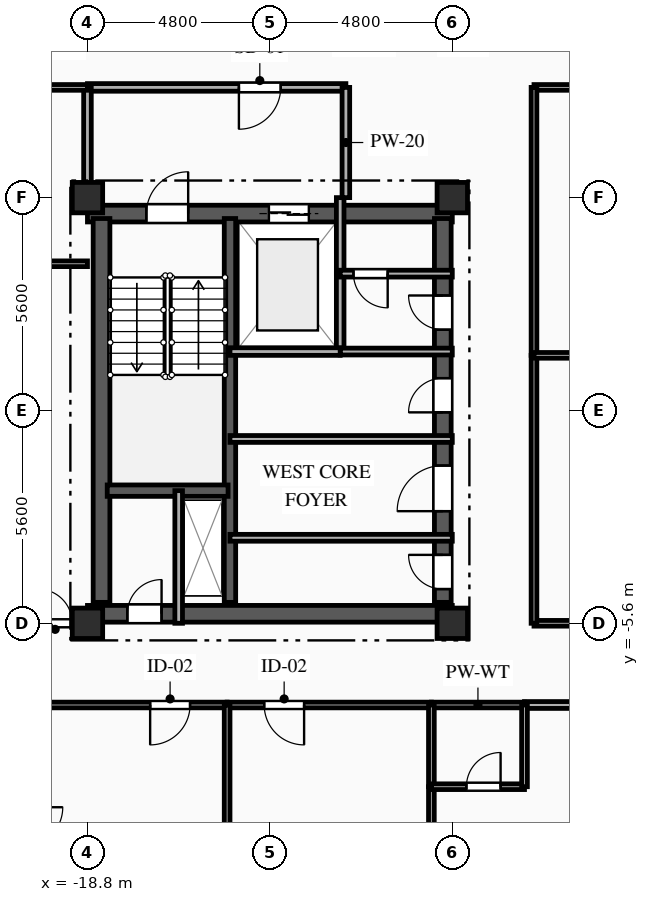
"""IFC4 building model, lengths in metres.
Left out: names, types, materials, properties, quantities, classifications, styles, units other than length and angle.
Written with IfcOpenShell. Run it as: python <this file> out.ifc"""

import sys

from ifc_helpers import new_model, si_unit, direction, frame, frame_2d, origin, origin_2d, place, context, subcontext, project, spatial, rectangle, extrude, element, fill, save


model = new_model("IFC4")
c1 = context("Model", 3, precision=1e-05, world=origin(), true_north=direction((0.0, 1.0)))
c2 = subcontext(c1, "Body", "Model", "MODEL_VIEW")
j1 = project(units=[si_unit("LENGTHUNIT", "METRE"), si_unit("PLANEANGLEUNIT", "RADIAN")], contexts=[c1])
p1 = place(None, origin())
s1 = spatial("IfcSite", under=j1, at=p1, CompositionType="ELEMENT")
p2 = place(p1, origin())
s2 = spatial("IfcBuilding", under=s1, at=p2, CompositionType="ELEMENT")
p3 = place(p2, frame((0.0, 0.0, 251.75)))
s3 = spatial("IfcBuildingStorey", under=s2, at=p3, CompositionType="ELEMENT", Elevation=251.75)
for number, where, z_axis, x_axis in (
    (1, (-18.8, -5.6, 0.0), (0.0, 0.0, 1.0), (1.0, 0.0, 0.0)),
    (2, (-18.8, 5.6, 0.0), (0.0, 0.0, 1.0), (1.0, 0.0, 0.0)),
    (3, (-9.2, -5.6, 0.0), (0.0, 0.0, 1.0), (1.0, 0.0, 0.0)),
    (4, (-9.2, 5.6, 0.0), (0.0, 0.0, 1.0), (1.0, 0.0, 0.0)),
):
    element("IfcColumn", number, at=place(p3, frame(where, z_axis=z_axis, x_axis=x_axis)), inside=s3, PredefinedType="COLUMN", context=c2, shape_type="SweptSolid", body=[
        extrude(rectangle(XDim=0.8, YDim=0.8, at=origin_2d()), origin(), (0.0, 0.0, 1.0), 3.35),
    ])
p4 = place(p3, frame((-18.8, 5.18, 0.0), z_axis=(0.0, 0.0, 1.0), x_axis=(1.0, 0.0, 0.0)))
e5 = element("IfcWall", 5, at=p4, inside=s3, PredefinedType="SHEAR", context=c2, shape_type="SweptSolid", body=[
    extrude(rectangle(XDim=9.6, YDim=0.44, at=frame_2d((4.8, 0.0))), origin(), (0.0, 0.0, 1.0), 3.04),
])
p5 = place(p4, frame((1.55, 0.0, 0.0)))
e6 = element("IfcOpeningElement", 6, at=p5, cuts=e5, PredefinedType="OPENING", context=c2, shape_type="SweptSolid", body=[
    extrude(rectangle(XDim=1.1, YDim=2.15, at=frame_2d((0.55, 1.075))), frame((0.0, 0.23, 0.0), z_axis=(0.0, -1.0, 0.0), x_axis=(1.0, 0.0, 0.0)), (0.0, 0.0, 1.0), 0.46),
])
p6 = place(p4, frame((4.775, 0.0, 0.0)))
e7 = element("IfcOpeningElement", 7, at=p6, cuts=e5, PredefinedType="OPENING", context=c2, shape_type="SweptSolid", body=[
    extrude(rectangle(XDim=1.05, YDim=2.1, at=frame_2d((0.525, 1.05))), frame((0.0, 0.23, 0.0), z_axis=(0.0, -1.0, 0.0), x_axis=(1.0, 0.0, 0.0)), (0.0, 0.0, 1.0), 0.46),
])
p7 = place(p3, frame((-18.8, -5.35, 0.0), z_axis=(0.0, 0.0, 1.0), x_axis=(1.0, 0.0, 0.0)))
e8 = element("IfcWall", 8, at=p7, inside=s3, PredefinedType="SHEAR", context=c2, shape_type="SweptSolid", body=[
    extrude(rectangle(XDim=9.6, YDim=0.44, at=frame_2d((4.8, 0.0))), origin(), (0.0, 0.0, 1.0), 3.04),
])
p8 = place(p7, frame((1.05, 0.0, 0.0)))
e9 = element("IfcOpeningElement", 9, at=p8, cuts=e8, PredefinedType="OPENING", context=c2, shape_type="SweptSolid", body=[
    extrude(rectangle(XDim=0.9, YDim=2.1, at=frame_2d((0.45, 1.05))), frame((0.0, 0.23, 0.0), z_axis=(0.0, -1.0, 0.0), x_axis=(1.0, 0.0, 0.0)), (0.0, 0.0, 1.0), 0.46),
])
p9 = place(p3, frame((-18.43, -5.05, 0.0), z_axis=(0.0, 0.0, 1.0), x_axis=(0.0, 1.0, 0.0)))
e10 = element("IfcWall", 10, at=p9, inside=s3, PredefinedType="SHEAR", context=c2, shape_type="SweptSolid", body=[
    extrude(rectangle(XDim=10.1, YDim=0.44, at=frame_2d((5.05, 0.0))), origin(), (0.0, 0.0, 1.0), 3.04),
])
p10 = place(p3, frame((-9.45, -5.05, 0.0), z_axis=(0.0, 0.0, 1.0), x_axis=(0.0, 1.0, 0.0)))
e11 = element("IfcWall", 11, at=p10, inside=s3, PredefinedType="SHEAR", context=c2, shape_type="SweptSolid", body=[
    extrude(rectangle(XDim=10.1, YDim=0.44, at=frame_2d((5.05, 0.0))), origin(), (0.0, 0.0, 1.0), 3.04),
])
p11 = place(p10, frame((7.175, 0.0, 0.0)))
e12 = element("IfcOpeningElement", 12, at=p11, cuts=e11, PredefinedType="OPENING", context=c2, shape_type="SweptSolid", body=[
    extrude(rectangle(XDim=0.9, YDim=2.1, at=frame_2d((0.45, 1.05))), frame((0.0, 0.23, 0.0), z_axis=(0.0, -1.0, 0.0), x_axis=(1.0, 0.0, 0.0)), (0.0, 0.0, 1.0), 0.46),
])
p12 = place(p10, frame((2.4, 0.0, 0.0)))
e13 = element("IfcOpeningElement", 13, at=p12, cuts=e11, PredefinedType="OPENING", context=c2, shape_type="SweptSolid", body=[
    extrude(rectangle(XDim=1.2, YDim=2.15, at=frame_2d((0.6, 1.075))), frame((0.0, 0.23, 0.0), z_axis=(0.0, -1.0, 0.0), x_axis=(1.0, 0.0, 0.0)), (0.0, 0.0, 1.0), 0.46),
])
p13 = place(p10, frame((0.35, 0.0, 0.0)))
e14 = element("IfcOpeningElement", 14, at=p13, cuts=e11, PredefinedType="OPENING", context=c2, shape_type="SweptSolid", body=[
    extrude(rectangle(XDim=0.9, YDim=2.1, at=frame_2d((0.45, 1.05))), frame((0.0, 0.23, 0.0), z_axis=(0.0, -1.0, 0.0), x_axis=(1.0, 0.0, 0.0)), (0.0, 0.0, 1.0), 0.46),
])
p14 = place(p10, frame((5.0, 0.0, 0.0)))
e15 = element("IfcOpeningElement", 15, at=p14, cuts=e11, PredefinedType="OPENING", context=c2, shape_type="SweptSolid", body=[
    extrude(rectangle(XDim=0.9, YDim=2.1, at=frame_2d((0.45, 1.05))), frame((0.0, 0.23, 0.0), z_axis=(0.0, -1.0, 0.0), x_axis=(1.0, 0.0, 0.0)), (0.0, 0.0, 1.0), 0.46),
])
p15 = place(p3, frame((-15.05, -5.05, 0.0), z_axis=(0.0, 0.0, 1.0), x_axis=(0.0, 1.0, 0.0)))
e16 = element("IfcWall", 16, at=p15, inside=s3, PredefinedType="SHEAR", context=c2, shape_type="SweptSolid", body=[
    extrude(rectangle(XDim=10.1, YDim=0.3, at=frame_2d((5.05, 0.0))), origin(), (0.0, 0.0, 1.0), 3.04),
])
p16 = place(p3, frame((-18.28, -2.11, 0.0), z_axis=(0.0, 0.0, 1.0), x_axis=(1.0, 0.0, 0.0)))
e17 = element("IfcWall", 17, at=p16, inside=s3, PredefinedType="SHEAR", context=c2, shape_type="SweptSolid", body=[
    extrude(rectangle(XDim=3.18, YDim=0.3, at=frame_2d((1.59, 0.0))), origin(), (0.0, 0.0, 1.0), 3.04),
])
p17 = place(p3, frame((-16.4, -5.6, 0.0), z_axis=(0.0, 0.0, 1.0), x_axis=(0.0, 1.0, 0.0)))
e18 = element("IfcWall", 18, at=p17, inside=s3, PredefinedType="PARTITIONING", context=c2, shape_type="SweptSolid", body=[
    extrude(rectangle(XDim=3.49, YDim=0.2, at=frame_2d((1.745, 0.0))), origin(), (0.0, 0.0, 1.0), 3.04),
])
p18 = place(p3, frame((-12.15, 1.55, 0.0), z_axis=(0.0, 0.0, 1.0), x_axis=(0.0, 1.0, 0.0)))
e19 = element("IfcWall", 19, at=p18, inside=s3, PredefinedType="PARTITIONING", context=c2, shape_type="SweptSolid", body=[
    extrude(rectangle(XDim=2.05, YDim=0.2, at=frame_2d((1.025, 0.0))), origin(), (0.0, 0.0, 1.0), 3.04),
])
p19 = place(p3, frame((-12.15, 3.6, 0.0), z_axis=(0.0, 0.0, 1.0), x_axis=(0.0, 1.0, 0.0)))
e20 = element("IfcWall", 20, at=p19, inside=s3, PredefinedType="PARTITIONING", context=c2, shape_type="SweptSolid", body=[
    extrude(rectangle(XDim=2.0, YDim=0.2, at=frame_2d((1.0, 0.0))), origin(), (0.0, 0.0, 1.0), 3.04),
])
p20 = place(p3, frame((-12.0, 8.5, 0.0), z_axis=(0.0, 0.0, 1.0), x_axis=(-1.0, 0.0, 0.0)))
e21 = element("IfcWall", 21, at=p20, inside=s3, PredefinedType="PARTITIONING", context=c2, shape_type="SweptSolid", body=[
    extrude(rectangle(XDim=6.8, YDim=0.2, at=frame_2d((3.4, 0.0))), origin(), (0.0, 0.0, 1.0), 3.04),
])
p21 = place(p20, frame((1.715, 0.0, 0.0)))
e22 = element("IfcOpeningElement", 22, at=p21, cuts=e21, PredefinedType="OPENING", context=c2, shape_type="SweptSolid", body=[
    extrude(rectangle(XDim=1.1, YDim=2.15, at=frame_2d((0.55, 1.075))), frame((0.0, 0.11, 0.0), z_axis=(0.0, -1.0, 0.0), x_axis=(1.0, 0.0, 0.0)), (0.0, 0.0, 1.0), 0.22),
])
p22 = place(p3, frame((-12.0, 5.6, 0.0), z_axis=(0.0, 0.0, 1.0), x_axis=(0.0, 1.0, 0.0)))
e23 = element("IfcWall", 23, at=p22, inside=s3, PredefinedType="PARTITIONING", context=c2, shape_type="SweptSolid", body=[
    extrude(rectangle(XDim=2.9, YDim=0.2, at=frame_2d((1.45, 0.0))), origin(), (0.0, 0.0, 1.0), 3.04),
])
p23 = place(p3, frame((-18.8, 8.5, 0.0), z_axis=(0.0, 0.0, 1.0), x_axis=(0.0, -1.0, 0.0)))
e24 = element("IfcWall", 24, at=p23, inside=s3, PredefinedType="PARTITIONING", context=c2, shape_type="SweptSolid", body=[
    extrude(rectangle(XDim=2.9, YDim=0.2, at=frame_2d((1.45, 0.0))), origin(), (0.0, 0.0, 1.0), 2.665),
])
p24 = place(p3, frame((-9.2, 3.6, 0.0), z_axis=(0.0, 0.0, 1.0), x_axis=(-1.0, 0.0, 0.0)))
e25 = element("IfcWall", 25, at=p24, inside=s3, PredefinedType="PARTITIONING", context=c2, shape_type="SweptSolid", body=[
    extrude(rectangle(XDim=2.95, YDim=0.18, at=frame_2d((1.475, 0.0))), origin(), (0.0, 0.0, 1.0), 3.04),
])
p25 = place(p24, frame((1.7, 0.0, 0.0)))
e26 = element("IfcOpeningElement", 26, at=p25, cuts=e25, PredefinedType="OPENING", context=c2, shape_type="SweptSolid", body=[
    extrude(rectangle(XDim=0.9, YDim=2.1, at=frame_2d((0.45, 1.05))), frame((0.0, 0.1, 0.0), z_axis=(0.0, -1.0, 0.0), x_axis=(1.0, 0.0, 0.0)), (0.0, 0.0, 1.0), 0.2),
])
p26 = place(p3, frame((-12.15, 1.55, 0.0), z_axis=(0.0, 0.0, 1.0), x_axis=(1.0, 0.0, 0.0)))
e27 = element("IfcWall", 27, at=p26, inside=s3, PredefinedType="PARTITIONING", context=c2, shape_type="SweptSolid", body=[
    extrude(rectangle(XDim=2.95, YDim=0.18, at=frame_2d((1.475, 0.0))), origin(), (0.0, 0.0, 1.0), 3.04),
])
p27 = place(p3, frame((-15.05, -3.35, 0.0), z_axis=(0.0, 0.0, 1.0), x_axis=(1.0, 0.0, 0.0)))
e28 = element("IfcWall", 28, at=p27, inside=s3, PredefinedType="PARTITIONING", context=c2, shape_type="SweptSolid", body=[
    extrude(rectangle(XDim=5.85, YDim=0.18, at=frame_2d((2.925, 0.0))), origin(), (0.0, 0.0, 1.0), 2.755),
])
p28 = place(p3, frame((-9.2, -0.75, 0.0), z_axis=(0.0, 0.0, 1.0), x_axis=(-1.0, 0.0, 0.0)))
e29 = element("IfcWall", 29, at=p28, inside=s3, PredefinedType="PARTITIONING", context=c2, shape_type="SweptSolid", body=[
    extrude(rectangle(XDim=5.85, YDim=0.18, at=frame_2d((2.925, 0.0))), origin(), (0.0, 0.0, 1.0), 3.04),
])
p29 = place(p3, frame((-18.8, 8.5, 0.0), z_axis=(0.0, 0.0, 1.0), x_axis=(-1.0, 0.0, 0.0)))
e30 = element("IfcWall", 30, at=p29, inside=s3, PredefinedType="PARTITIONING", context=c2, shape_type="SweptSolid", body=[
    extrude(rectangle(XDim=1.7, YDim=0.15, at=frame_2d((0.85, 0.0))), origin(), (0.0, 0.0, 1.0), 3.04),
])
p30 = place(p3, frame((0.0, 8.5, 0.0), z_axis=(0.0, 0.0, 1.0), x_axis=(-1.0, 0.0, 0.0)))
e31 = element("IfcWall", 31, at=p30, inside=s3, PredefinedType="PARTITIONING", context=c2, shape_type="SweptSolid", body=[
    extrude(rectangle(XDim=7.05, YDim=0.15, at=frame_2d((3.525, 0.0))), origin(), (0.0, 0.0, 1.0), 3.04),
])
p31 = place(p30, frame((2.395, 0.0, 0.0)))
e32 = element("IfcOpeningElement", 32, at=p31, cuts=e31, PredefinedType="OPENING", context=c2, shape_type="SweptSolid", body=[
    extrude(rectangle(XDim=1.05, YDim=2.15, at=frame_2d((0.525, 1.075))), frame((0.0, 0.085, 0.0), z_axis=(0.0, -1.0, 0.0), x_axis=(1.0, 0.0, 0.0)), (0.0, 0.0, 1.0), 0.17),
])
p32 = place(p3, frame((-20.5, -5.6, 0.0), z_axis=(0.0, 0.0, 1.0), x_axis=(1.0, 0.0, 0.0)))
e33 = element("IfcWall", 33, at=p32, inside=s3, PredefinedType="PARTITIONING", context=c2, shape_type="SweptSolid", body=[
    extrude(rectangle(XDim=1.7, YDim=0.15, at=frame_2d((0.85, 0.0))), origin(), (0.0, 0.0, 1.0), 3.04),
])
p33 = place(p32, frame((0.4, 0.0, 0.0)))
e34 = element("IfcOpeningElement", 34, at=p33, cuts=e33, PredefinedType="OPENING", context=c2, shape_type="SweptSolid", body=[
    extrude(rectangle(XDim=0.9, YDim=2.1, at=frame_2d((0.45, 1.05))), frame((0.0, 0.085, 0.0), z_axis=(0.0, -1.0, 0.0), x_axis=(1.0, 0.0, 0.0)), (0.0, 0.0, 1.0), 0.17),
])
p34 = place(p3, frame((-15.125, -7.75, 0.0), z_axis=(0.0, 0.0, 1.0), x_axis=(-1.0, 0.0, 0.0)))
e35 = element("IfcWall", 35, at=p34, inside=s3, PredefinedType="PARTITIONING", context=c2, shape_type="SweptSolid", body=[
    extrude(rectangle(XDim=5.375, YDim=0.15, at=frame_2d((2.688, 0.0))), origin(), (0.0, 0.0, 1.0), 3.04),
])
p35 = place(p34, frame((0.976, 0.0, 0.0)))
e36 = element("IfcOpeningElement", 36, at=p35, cuts=e35, PredefinedType="OPENING", context=c2, shape_type="SweptSolid", body=[
    extrude(rectangle(XDim=1.05, YDim=2.15, at=frame_2d((0.525, 1.075))), frame((0.0, 0.085, 0.0), z_axis=(0.0, -1.0, 0.0), x_axis=(1.0, 0.0, 0.0)), (0.0, 0.0, 1.0), 0.17),
])
p36 = place(p3, frame((-9.75, -7.75, 0.0), z_axis=(0.0, 0.0, 1.0), x_axis=(-1.0, 0.0, 0.0)))
e37 = element("IfcWall", 37, at=p36, inside=s3, PredefinedType="PARTITIONING", context=c2, shape_type="SweptSolid", body=[
    extrude(rectangle(XDim=5.375, YDim=0.15, at=frame_2d((2.688, 0.0))), origin(), (0.0, 0.0, 1.0), 3.04),
])
p37 = place(p36, frame((3.349, 0.0, 0.0)))
e38 = element("IfcOpeningElement", 38, at=p37, cuts=e37, PredefinedType="OPENING", context=c2, shape_type="SweptSolid", body=[
    extrude(rectangle(XDim=1.05, YDim=2.15, at=frame_2d((0.525, 1.075))), frame((0.0, 0.085, 0.0), z_axis=(0.0, -1.0, 0.0), x_axis=(1.0, 0.0, 0.0)), (0.0, 0.0, 1.0), 0.17),
])
p38 = place(p3, frame((0.0, -7.75, 0.0), z_axis=(0.0, 0.0, 1.0), x_axis=(-1.0, 0.0, 0.0)))
e39 = element("IfcWall", 39, at=p38, inside=s3, PredefinedType="PARTITIONING", context=c2, shape_type="SweptSolid", body=[
    extrude(rectangle(XDim=7.3, YDim=0.18, at=frame_2d((3.65, 0.0))), origin(), (0.0, 0.0, 1.0), 3.04),
])
p39 = place(p38, frame((1.222, 0.0, 0.0)))
e40 = element("IfcOpeningElement", 40, at=p39, cuts=e39, PredefinedType="OPENING", context=c2, shape_type="SweptSolid", body=[
    extrude(rectangle(XDim=1.0, YDim=2.15, at=frame_2d((0.5, 1.075))), frame((0.0, 0.1, 0.0), z_axis=(0.0, -1.0, 0.0), x_axis=(1.0, 0.0, 0.0)), (0.0, 0.0, 1.0), 0.2),
])
p40 = place(p3, frame((-7.3, -7.75, 0.0), z_axis=(0.0, 0.0, 1.0), x_axis=(-1.0, 0.0, 0.0)))
e41 = element("IfcWall", 41, at=p40, inside=s3, PredefinedType="PLUMBINGWALL", context=c2, shape_type="SweptSolid", body=[
    extrude(rectangle(XDim=2.45, YDim=0.15, at=frame_2d((1.225, 0.0))), origin(), (0.0, 0.0, 1.0), 3.04),
])
p41 = place(p3, frame((-7.05, -5.6, 0.0), z_axis=(0.0, 0.0, 1.0), x_axis=(1.0, 0.0, 0.0)))
e42 = element("IfcWall", 42, at=p41, inside=s3, PredefinedType="PARTITIONING", context=c2, shape_type="SweptSolid", body=[
    extrude(rectangle(XDim=7.05, YDim=0.15, at=frame_2d((3.525, 0.0))), origin(), (0.0, 0.0, 1.0), 2.525),
])
p42 = place(p41, frame((4.815, 0.0, 0.0)))
e43 = element("IfcOpeningElement", 43, at=p42, cuts=e42, PredefinedType="OPENING", context=c2, shape_type="SweptSolid", body=[
    extrude(rectangle(XDim=1.05, YDim=2.15, at=frame_2d((0.525, 1.075))), frame((0.0, 0.085, 0.0), z_axis=(0.0, -1.0, 0.0), x_axis=(1.0, 0.0, 0.0)), (0.0, 0.0, 1.0), 0.17),
])
for number, where, z_axis, x_axis in (
    (44, (-7.05, 1.45, 0.0), (0.0, 0.0, 1.0), (0.0, -1.0, 0.0)),
    (45, (-7.05, 8.5, 0.0), (0.0, 0.0, 1.0), (0.0, -1.0, 0.0)),
):
    element("IfcWall", number, at=place(p3, frame(where, z_axis=z_axis, x_axis=x_axis)), inside=s3, PredefinedType="PARTITIONING", context=c2, shape_type="SweptSolid", body=[
        extrude(rectangle(XDim=7.05, YDim=0.15, at=frame_2d((3.525, 0.0))), origin(), (0.0, 0.0, 1.0), 3.04),
    ])
p43 = place(p3, frame((-24.0, 3.86, 0.0), z_axis=(0.0, 0.0, 1.0), x_axis=(1.0, 0.0, 0.0)))
e46 = element("IfcWall", 46, at=p43, inside=s3, PredefinedType="PARTITIONING", context=c2, shape_type="SweptSolid", body=[
    extrude(rectangle(XDim=5.2, YDim=0.15, at=frame_2d((2.6, 0.0))), origin(), (0.0, 0.0, 1.0), 3.04),
])
p44 = place(p3, frame((-15.125, -7.75, 0.0), z_axis=(0.0, 0.0, 1.0), x_axis=(0.0, -1.0, 0.0)))
e47 = element("IfcWall", 47, at=p44, inside=s3, PredefinedType="PARTITIONING", context=c2, shape_type="SweptSolid", body=[
    extrude(rectangle(XDim=10.65, YDim=0.15, at=frame_2d((5.325, 0.0))), origin(), (0.0, 0.0, 1.0), 3.04),
])
p45 = place(p3, frame((-9.75, -9.9, 0.0), z_axis=(0.0, 0.0, 1.0), x_axis=(0.0, -1.0, 0.0)))
e48 = element("IfcWall", 48, at=p45, inside=s3, PredefinedType="PARTITIONING", context=c2, shape_type="SweptSolid", body=[
    extrude(rectangle(XDim=8.5, YDim=0.15, at=frame_2d((4.25, 0.0))), origin(), (0.0, 0.0, 1.0), 3.04),
])
p46 = place(p3, frame((-9.75, -7.75, 0.0), z_axis=(0.0, 0.0, 1.0), x_axis=(0.0, -1.0, 0.0)))
e49 = element("IfcWall", 49, at=p46, inside=s3, PredefinedType="PLUMBINGWALL", context=c2, shape_type="SweptSolid", body=[
    extrude(rectangle(XDim=2.15, YDim=0.15, at=frame_2d((1.075, 0.0))), origin(), (0.0, 0.0, 1.0), 3.04),
])
p47 = place(p3, frame((-9.75, -9.9, 0.0), z_axis=(0.0, 0.0, 1.0), x_axis=(1.0, 0.0, 0.0)))
e50 = element("IfcWall", 50, at=p47, inside=s3, PredefinedType="PLUMBINGWALL", context=c2, shape_type="SweptSolid", body=[
    extrude(rectangle(XDim=2.45, YDim=0.15, at=frame_2d((1.225, 0.0))), origin(), (0.0, 0.0, 1.0), 3.04),
])
p48 = place(p47, frame((0.921, 0.0, 0.0)))
e51 = element("IfcOpeningElement", 51, at=p48, cuts=e50, PredefinedType="OPENING", context=c2, shape_type="SweptSolid", body=[
    extrude(rectangle(XDim=0.9, YDim=2.1, at=frame_2d((0.45, 1.05))), frame((0.0, 0.085, 0.0), z_axis=(0.0, -1.0, 0.0), x_axis=(1.0, 0.0, 0.0)), (0.0, 0.0, 1.0), 0.17),
])
p49 = place(p3, frame((-7.3, -9.9, 0.0), z_axis=(0.0, 0.0, 1.0), x_axis=(0.0, 1.0, 0.0)))
e52 = element("IfcWall", 52, at=p49, inside=s3, PredefinedType="PLUMBINGWALL", context=c2, shape_type="SweptSolid", body=[
    extrude(rectangle(XDim=2.15, YDim=0.15, at=frame_2d((1.075, 0.0))), origin(), (0.0, 0.0, 1.0), 3.04),
])
p50 = place(p3, frame((-7.05, 1.45, 0.0), z_axis=(0.0, 0.0, 1.0), x_axis=(1.0, 0.0, 0.0)))
e53 = element("IfcWall", 53, at=p50, inside=s3, PredefinedType="PARTITIONING", context=c2, shape_type="SweptSolid", body=[
    extrude(rectangle(XDim=14.1, YDim=0.15, at=frame_2d((7.05, 0.0))), origin(), (0.0, 0.0, 1.0), 3.04),
])
p51 = place(p3, frame((-15.05, 1.55, 0.0), z_axis=(0.0, 0.0, 1.0), x_axis=(1.0, 0.0, 0.0)))
e54 = element("IfcWall", 54, at=p51, inside=s3, PredefinedType="PARTITIONING", context=c2, shape_type="SweptSolid", body=[
    extrude(rectangle(XDim=2.9, YDim=0.2, at=frame_2d((1.45, 0.0))), origin(), (0.0, 0.0, 1.0), 3.04),
])
p52 = place(p5, origin())
e55 = element("IfcDoor", 55, at=p52, inside=s3, OperationType="SINGLE_SWING_RIGHT", PredefinedType="DOOR", context=c2, shape_type="SweptSolid", body=[
    extrude(rectangle(XDim=1.1, YDim=2.15, at=frame_2d((0.55, 1.075))), frame((0.0, 0.025, 0.0), z_axis=(0.0, -1.0, 0.0), x_axis=(1.0, 0.0, 0.0)), (0.0, 0.0, 1.0), 0.05),
])
fill(e6, e55)
p53 = place(p6, origin())
e56 = element("IfcDoor", 56, at=p53, inside=s3, OperationType="DOUBLE_DOOR_SLIDING", PredefinedType="DOOR", context=c2, shape_type="SweptSolid", body=[
    extrude(rectangle(XDim=1.05, YDim=2.1, at=frame_2d((0.525, 1.05))), frame((0.0, 0.025, 0.0), z_axis=(0.0, -1.0, 0.0), x_axis=(1.0, 0.0, 0.0)), (0.0, 0.0, 1.0), 0.05),
])
fill(e7, e56)
p54 = place(p8, origin())
e57 = element("IfcDoor", 57, at=p54, inside=s3, OperationType="SINGLE_SWING_RIGHT", PredefinedType="DOOR", context=c2, shape_type="SweptSolid", body=[
    extrude(rectangle(XDim=0.9, YDim=2.1, at=frame_2d((0.45, 1.05))), frame((0.0, 0.025, 0.0), z_axis=(0.0, -1.0, 0.0), x_axis=(1.0, 0.0, 0.0)), (0.0, 0.0, 1.0), 0.05),
])
fill(e9, e57)
p55 = place(p21, origin())
e58 = element("IfcDoor", 58, at=p55, inside=s3, OperationType="SINGLE_SWING_RIGHT", PredefinedType="DOOR", context=c2, shape_type="SweptSolid", body=[
    extrude(rectangle(XDim=1.1, YDim=2.15, at=frame_2d((0.55, 1.075))), frame((0.0, 0.025, 0.0), z_axis=(0.0, -1.0, 0.0), x_axis=(1.0, 0.0, 0.0)), (0.0, 0.0, 1.0), 0.05),
])
fill(e22, e58)
p56 = place(p25, origin())
e59 = element("IfcDoor", 59, at=p56, inside=s3, OperationType="SINGLE_SWING_LEFT", PredefinedType="DOOR", context=c2, shape_type="SweptSolid", body=[
    extrude(rectangle(XDim=0.9, YDim=2.1, at=frame_2d((0.45, 1.05))), frame((0.0, 0.025, 0.0), z_axis=(0.0, -1.0, 0.0), x_axis=(1.0, 0.0, 0.0)), (0.0, 0.0, 1.0), 0.05),
])
fill(e26, e59)
p57 = place(p11, origin())
e60 = element("IfcDoor", 60, at=p57, inside=s3, OperationType="SINGLE_SWING_RIGHT", PredefinedType="DOOR", context=c2, shape_type="SweptSolid", body=[
    extrude(rectangle(XDim=0.9, YDim=2.1, at=frame_2d((0.45, 1.05))), frame((0.0, 0.025, 0.0), z_axis=(0.0, -1.0, 0.0), x_axis=(1.0, 0.0, 0.0)), (0.0, 0.0, 1.0), 0.05),
])
fill(e12, e60)
p58 = place(p12, origin())
e61 = element("IfcDoor", 61, at=p58, inside=s3, OperationType="SINGLE_SWING_LEFT", PredefinedType="DOOR", context=c2, shape_type="SweptSolid", body=[
    extrude(rectangle(XDim=1.2, YDim=2.15, at=frame_2d((0.6, 1.075))), frame((0.0, 0.025, 0.0), z_axis=(0.0, -1.0, 0.0), x_axis=(1.0, 0.0, 0.0)), (0.0, 0.0, 1.0), 0.05),
])
fill(e13, e61)
p59 = place(p13, origin())
e62 = element("IfcDoor", 62, at=p59, inside=s3, OperationType="SINGLE_SWING_RIGHT", PredefinedType="DOOR", context=c2, shape_type="SweptSolid", body=[
    extrude(rectangle(XDim=0.9, YDim=2.1, at=frame_2d((0.45, 1.05))), frame((0.0, 0.025, 0.0), z_axis=(0.0, -1.0, 0.0), x_axis=(1.0, 0.0, 0.0)), (0.0, 0.0, 1.0), 0.05),
])
fill(e14, e62)
p60 = place(p14, origin())
e63 = element("IfcDoor", 63, at=p60, inside=s3, OperationType="SINGLE_SWING_LEFT", PredefinedType="DOOR", context=c2, shape_type="SweptSolid", body=[
    extrude(rectangle(XDim=0.9, YDim=2.1, at=frame_2d((0.45, 1.05))), frame((0.0, 0.025, 0.0), z_axis=(0.0, -1.0, 0.0), x_axis=(1.0, 0.0, 0.0)), (0.0, 0.0, 1.0), 0.05),
])
fill(e15, e63)
p61 = place(p33, origin())
e64 = element("IfcDoor", 64, at=p61, inside=s3, OperationType="SINGLE_SWING_LEFT", PredefinedType="DOOR", context=c2, shape_type="SweptSolid", body=[
    extrude(rectangle(XDim=0.9, YDim=2.1, at=frame_2d((0.45, 1.05))), frame((0.0, 0.025, 0.0), z_axis=(0.0, -1.0, 0.0), x_axis=(1.0, 0.0, 0.0)), (0.0, 0.0, 1.0), 0.05),
])
fill(e34, e64)
p62 = place(p35, origin())
e65 = element("IfcDoor", 65, at=p62, inside=s3, OperationType="SINGLE_SWING_RIGHT", PredefinedType="DOOR", context=c2, shape_type="SweptSolid", body=[
    extrude(rectangle(XDim=1.05, YDim=2.15, at=frame_2d((0.525, 1.075))), frame((0.0, 0.025, 0.0), z_axis=(0.0, -1.0, 0.0), x_axis=(1.0, 0.0, 0.0)), (0.0, 0.0, 1.0), 0.05),
])
fill(e36, e65)
p63 = place(p37, origin())
e66 = element("IfcDoor", 66, at=p63, inside=s3, OperationType="SINGLE_SWING_LEFT", PredefinedType="DOOR", context=c2, shape_type="SweptSolid", body=[
    extrude(rectangle(XDim=1.05, YDim=2.15, at=frame_2d((0.525, 1.075))), frame((0.0, 0.025, 0.0), z_axis=(0.0, -1.0, 0.0), x_axis=(1.0, 0.0, 0.0)), (0.0, 0.0, 1.0), 0.05),
])
fill(e38, e66)
p64 = place(p48, origin())
e67 = element("IfcDoor", 67, at=p64, inside=s3, OperationType="SINGLE_SWING_RIGHT", PredefinedType="DOOR", context=c2, shape_type="SweptSolid", body=[
    extrude(rectangle(XDim=0.9, YDim=2.1, at=frame_2d((0.45, 1.05))), frame((0.0, 0.025, 0.0), z_axis=(0.0, -1.0, 0.0), x_axis=(1.0, 0.0, 0.0)), (0.0, 0.0, 1.0), 0.05),
])
fill(e51, e67)
save(model, sys.argv[1])
